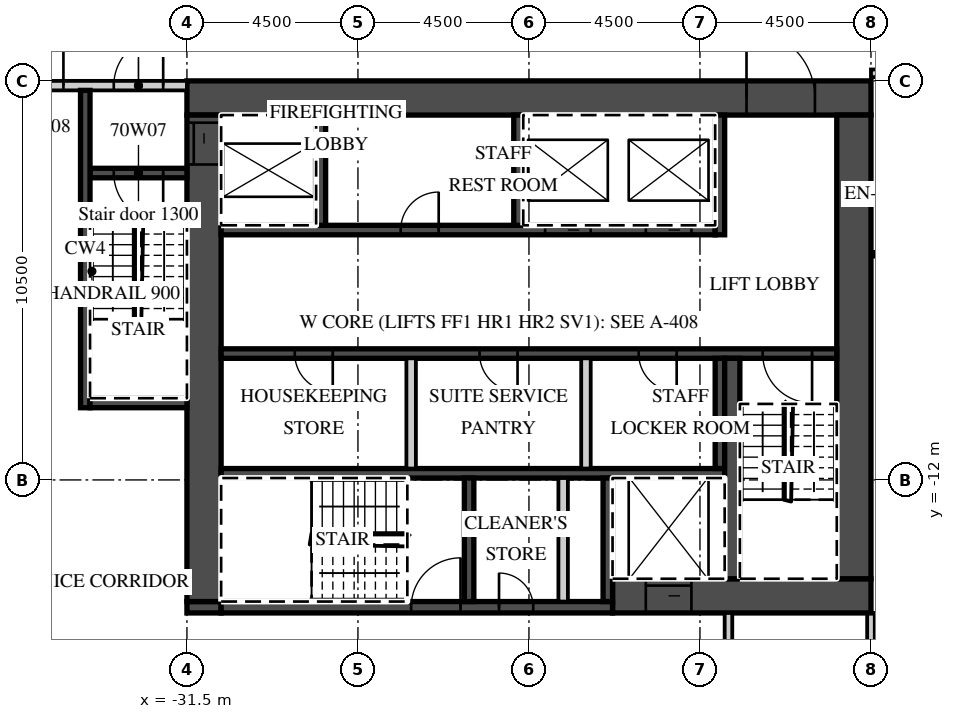
"""IFC4 building model, lengths in metres.
Left out: names, types, materials, properties, quantities, classifications, styles, units other than length and angle.
Written with IfcOpenShell. Run it as: python <this file> out.ifc"""

import sys

from ifc_helpers import new_model, si_unit, direction, frame, frame_2d, origin, place, context, subcontext, project, spatial, rectangle, extrude, element, fill, save


model = new_model("IFC4")
c1 = context("Model", 3, precision=1e-05, world=origin(), true_north=direction((0.0, 1.0)))
c2 = subcontext(c1, "Body", "Model", "MODEL_VIEW")
j1 = project(units=[si_unit("LENGTHUNIT", "METRE"), si_unit("PLANEANGLEUNIT", "RADIAN")], contexts=[c1])
p1 = place(None, origin())
s1 = spatial("IfcSite", under=j1, at=p1, CompositionType="ELEMENT")
p2 = place(p1, origin())
s2 = spatial("IfcBuilding", under=s1, at=p2, CompositionType="ELEMENT")
p3 = place(p2, frame((0.0, 0.0, 281.7)))
s3 = spatial("IfcBuildingStorey", under=s2, at=p3, CompositionType="ELEMENT", Elevation=281.7)
p4 = place(p3, frame((-13.5, -21.396, 0.0), z_axis=(0.0, 0.0, 1.0), x_axis=(0.0, 1.0, 0.0)))
e1 = element("IfcWall", 1, at=p4, inside=s3, PredefinedType="PARTITIONING", context=c2, shape_type="SweptSolid", body=[
    extrude(rectangle(XDim=5.896, YDim=0.2, at=frame_2d((2.948, 0.0))), origin(), (0.0, 0.0, 1.0), 3.02),
])
p5 = place(p3, frame((-13.5, -1.3, 0.0), z_axis=(0.0, 0.0, 1.0), x_axis=(1.0, 0.0, 0.0)))
e2 = element("IfcWall", 2, at=p5, inside=s3, PredefinedType="PARTITIONING", context=c2, shape_type="SweptSolid", body=[
    extrude(rectangle(XDim=50.293, YDim=0.2, at=frame_2d((25.146, 0.0))), origin(), (0.0, 0.0, 1.0), 3.02),
])
p6 = place(p5, frame((2.925, 0.0, 0.0)))
e3 = element("IfcOpeningElement", 3, at=p6, cuts=e2, PredefinedType="OPENING", context=c2, shape_type="SweptSolid", body=[
    extrude(rectangle(XDim=1.0, YDim=2.1, at=frame_2d((0.5, 1.05))), frame((0.0, 0.11, 0.0), z_axis=(0.0, -1.0, 0.0), x_axis=(1.0, 0.0, 0.0)), (0.0, 0.0, 1.0), 0.22),
])
p7 = place(p5, frame((6.938, 0.0, 0.0)))
e4 = element("IfcOpeningElement", 4, at=p7, cuts=e2, PredefinedType="OPENING", context=c2, shape_type="SweptSolid", body=[
    extrude(rectangle(XDim=1.2, YDim=2.1, at=frame_2d((0.6, 1.05))), frame((0.0, 0.11, 0.0), z_axis=(0.0, -1.0, 0.0), x_axis=(1.0, 0.0, 0.0)), (0.0, 0.0, 1.0), 0.22),
])
p8 = place(p5, frame((14.075, 0.0, 0.0)))
e5 = element("IfcOpeningElement", 5, at=p8, cuts=e2, PredefinedType="OPENING", context=c2, shape_type="SweptSolid", body=[
    extrude(rectangle(XDim=1.0, YDim=2.1, at=frame_2d((0.5, 1.05))), frame((0.0, 0.11, 0.0), z_axis=(0.0, -1.0, 0.0), x_axis=(1.0, 0.0, 0.0)), (0.0, 0.0, 1.0), 0.22),
])
p9 = place(p5, frame((18.55, 0.0, 0.0)))
e6 = element("IfcOpeningElement", 6, at=p9, cuts=e2, PredefinedType="OPENING", context=c2, shape_type="SweptSolid", body=[
    extrude(rectangle(XDim=1.0, YDim=2.1, at=frame_2d((0.5, 1.05))), frame((0.0, 0.11, 0.0), z_axis=(0.0, -1.0, 0.0), x_axis=(1.0, 0.0, 0.0)), (0.0, 0.0, 1.0), 0.22),
])
p10 = place(p5, frame((23.075, 0.0, 0.0)))
e7 = element("IfcOpeningElement", 7, at=p10, cuts=e2, PredefinedType="OPENING", context=c2, shape_type="SweptSolid", body=[
    extrude(rectangle(XDim=1.0, YDim=2.1, at=frame_2d((0.5, 1.05))), frame((0.0, 0.11, 0.0), z_axis=(0.0, -1.0, 0.0), x_axis=(1.0, 0.0, 0.0)), (0.0, 0.0, 1.0), 0.22),
])
p11 = place(p5, frame((29.925, 0.0, 0.0)))
e8 = element("IfcOpeningElement", 8, at=p11, cuts=e2, PredefinedType="OPENING", context=c2, shape_type="SweptSolid", body=[
    extrude(rectangle(XDim=1.0, YDim=2.1, at=frame_2d((0.5, 1.05))), frame((0.0, 0.11, 0.0), z_axis=(0.0, -1.0, 0.0), x_axis=(1.0, 0.0, 0.0)), (0.0, 0.0, 1.0), 0.22),
])
p12 = place(p5, frame((32.075, 0.0, 0.0)))
e9 = element("IfcOpeningElement", 9, at=p12, cuts=e2, PredefinedType="OPENING", context=c2, shape_type="SweptSolid", body=[
    extrude(rectangle(XDim=1.0, YDim=2.1, at=frame_2d((0.5, 1.05))), frame((0.0, 0.11, 0.0), z_axis=(0.0, -1.0, 0.0), x_axis=(1.0, 0.0, 0.0)), (0.0, 0.0, 1.0), 0.22),
])
p13 = place(p5, frame((36.55, 0.0, 0.0)))
e10 = element("IfcOpeningElement", 10, at=p13, cuts=e2, PredefinedType="OPENING", context=c2, shape_type="SweptSolid", body=[
    extrude(rectangle(XDim=1.0, YDim=2.1, at=frame_2d((0.5, 1.05))), frame((0.0, 0.11, 0.0), z_axis=(0.0, -1.0, 0.0), x_axis=(1.0, 0.0, 0.0)), (0.0, 0.0, 1.0), 0.22),
])
p14 = place(p5, frame((42.938, 0.0, 0.0)))
e11 = element("IfcOpeningElement", 11, at=p14, cuts=e2, PredefinedType="OPENING", context=c2, shape_type="SweptSolid", body=[
    extrude(rectangle(XDim=1.2, YDim=2.1, at=frame_2d((0.6, 1.05))), frame((0.0, 0.11, 0.0), z_axis=(0.0, -1.0, 0.0), x_axis=(1.0, 0.0, 0.0)), (0.0, 0.0, 1.0), 0.22),
])
p15 = place(p3, frame((-31.5, -1.95, 0.0), z_axis=(0.0, 0.0, 1.0), x_axis=(1.0, 0.0, 0.0)))
e12 = element("IfcWall", 12, at=p15, inside=s3, PredefinedType="SHEAR", context=c2, shape_type="SweptSolid", body=[
    extrude(rectangle(XDim=18.0, YDim=0.9, at=frame_2d((9.0, 0.0))), origin(), (0.0, 0.0, 1.0), 3.02),
])
p16 = place(p15, frame((14.725, 0.0, 0.0)))
e13 = element("IfcOpeningElement", 13, at=p16, cuts=e12, PredefinedType="OPENING", context=c2, shape_type="SweptSolid", body=[
    extrude(rectangle(XDim=1.8, YDim=2.1, at=frame_2d((0.9, 1.05))), frame((0.0, 0.46, 0.0), z_axis=(0.0, -1.0, 0.0), x_axis=(1.0, 0.0, 0.0)), (0.0, 0.0, 1.0), 0.92),
])
p17 = place(p3, frame((-20.3, -15.05, 0.0), z_axis=(0.0, 0.0, 1.0), x_axis=(1.0, 0.0, 0.0)))
e14 = element("IfcWall", 14, at=p17, inside=s3, PredefinedType="SHEAR", context=c2, shape_type="SweptSolid", body=[
    extrude(rectangle(XDim=6.8, YDim=0.9, at=frame_2d((3.4, 0.0))), origin(), (0.0, 0.0, 1.0), 3.02),
])
p18 = place(p17, frame((0.875, 0.0, 0.0)))
e15 = element("IfcOpeningElement", 15, at=p18, cuts=e14, PredefinedType="OPENING", context=c2, shape_type="SweptSolid", body=[
    extrude(rectangle(XDim=1.2, YDim=2.1, at=frame_2d((0.6, 1.05))), frame((0.0, 0.46, 0.0), z_axis=(0.0, -1.0, 0.0), x_axis=(1.0, 0.0, 0.0)), (0.0, 0.0, 1.0), 0.92),
])
p19 = place(p3, frame((-31.5, -15.35, 0.0), z_axis=(0.0, 0.0, 1.0), x_axis=(1.0, 0.0, 0.0)))
e16 = element("IfcWall", 16, at=p19, inside=s3, PredefinedType="SHEAR", context=c2, shape_type="SweptSolid", body=[
    extrude(rectangle(XDim=0.9, YDim=0.3, at=frame_2d((0.45, 0.0))), origin(), (0.0, 0.0, 1.0), 3.02),
])
p20 = place(p3, frame((-30.6, -15.35, 0.0), z_axis=(0.0, 0.0, 1.0), x_axis=(1.0, 0.0, 0.0)))
e17 = element("IfcWall", 17, at=p20, inside=s3, PredefinedType="SHEAR", context=c2, shape_type="SweptSolid", body=[
    extrude(rectangle(XDim=10.3, YDim=0.3, at=frame_2d((5.15, 0.0))), origin(), (0.0, 0.0, 1.0), 3.02),
])
p21 = place(p20, frame((5.0, 0.0, 0.0)))
e18 = element("IfcOpeningElement", 18, at=p21, cuts=e17, PredefinedType="OPENING", context=c2, shape_type="SweptSolid", body=[
    extrude(rectangle(XDim=1.3, YDim=2.1, at=frame_2d((0.65, 1.05))), frame((0.0, 0.16, 0.0), z_axis=(0.0, -1.0, 0.0), x_axis=(1.0, 0.0, 0.0)), (0.0, 0.0, 1.0), 0.32),
])
p22 = place(p20, frame((7.312, 0.0, 0.0)))
e19 = element("IfcOpeningElement", 19, at=p22, cuts=e17, PredefinedType="OPENING", context=c2, shape_type="SweptSolid", body=[
    extrude(rectangle(XDim=0.9, YDim=2.1, at=frame_2d((0.45, 1.05))), frame((0.0, 0.16, 0.0), z_axis=(0.0, -1.0, 0.0), x_axis=(1.0, 0.0, 0.0)), (0.0, 0.0, 1.0), 0.32),
])
p23 = place(p3, frame((-31.05, -15.2, 0.0), z_axis=(0.0, 0.0, 1.0), x_axis=(0.0, 1.0, 0.0)))
e20 = element("IfcWall", 20, at=p23, inside=s3, PredefinedType="SHEAR", context=c2, shape_type="SweptSolid", body=[
    extrude(rectangle(XDim=12.8, YDim=0.9, at=frame_2d((6.4, 0.0))), origin(), (0.0, 0.0, 1.0), 3.02),
])
p24 = place(p23, frame((11.5, 0.0, 0.0)))
e21 = element("IfcOpeningElement", 21, at=p24, cuts=e20, PredefinedType="OPENING", context=c2, shape_type="SweptSolid", body=[
    extrude(rectangle(XDim=1.1, YDim=2.1, at=frame_2d((0.55, 1.05))), frame((0.0, 0.46, 0.0), z_axis=(0.0, -1.0, 0.0), x_axis=(1.0, 0.0, 0.0)), (0.0, 0.0, 1.0), 0.92),
])
p25 = place(p3, frame((-13.95, -14.6, 0.0), z_axis=(0.0, 0.0, 1.0), x_axis=(0.0, 1.0, 0.0)))
e22 = element("IfcWall", 22, at=p25, inside=s3, PredefinedType="SHEAR", context=c2, shape_type="SweptSolid", body=[
    extrude(rectangle(XDim=12.2, YDim=0.9, at=frame_2d((6.1, 0.0))), origin(), (0.0, 0.0, 1.0), 3.02),
])
p26 = place(p3, frame((-30.6, -5.425, 0.0), z_axis=(0.0, 0.0, 1.0), x_axis=(1.0, 0.0, 0.0)))
e23 = element("IfcWall", 23, at=p26, inside=s3, PredefinedType="SHEAR", context=c2, shape_type="SweptSolid", body=[
    extrude(rectangle(XDim=13.0, YDim=0.25, at=frame_2d((6.5, 0.0))), origin(), (0.0, 0.0, 1.0), 3.02),
])
p27 = place(p26, frame((8.525, 0.0, 0.0)))
e24 = element("IfcOpeningElement", 24, at=p27, cuts=e23, PredefinedType="OPENING", context=c2, shape_type="SweptSolid", body=[
    extrude(rectangle(XDim=1.2, YDim=2.1, at=frame_2d((0.6, 1.05))), frame((0.0, 0.135, 0.0), z_axis=(0.0, -1.0, 0.0), x_axis=(1.0, 0.0, 0.0)), (0.0, 0.0, 1.0), 0.27),
])
p28 = place(p26, frame((11.175, 0.0, 0.0)))
e25 = element("IfcOpeningElement", 25, at=p28, cuts=e23, PredefinedType="OPENING", context=c2, shape_type="SweptSolid", body=[
    extrude(rectangle(XDim=1.2, YDim=2.1, at=frame_2d((0.6, 1.05))), frame((0.0, 0.135, 0.0), z_axis=(0.0, -1.0, 0.0), x_axis=(1.0, 0.0, 0.0)), (0.0, 0.0, 1.0), 0.27),
])
p29 = place(p26, frame((4.725, 0.0, 0.0)))
e26 = element("IfcOpeningElement", 26, at=p29, cuts=e23, PredefinedType="OPENING", context=c2, shape_type="SweptSolid", body=[
    extrude(rectangle(XDim=1.0, YDim=2.1, at=frame_2d((0.5, 1.05))), frame((0.0, 0.135, 0.0), z_axis=(0.0, -1.0, 0.0), x_axis=(1.0, 0.0, 0.0)), (0.0, 0.0, 1.0), 0.27),
])
p30 = place(p3, frame((-17.475, -5.55, 0.0), z_axis=(0.0, 0.0, 1.0), x_axis=(0.0, 1.0, 0.0)))
e27 = element("IfcWall", 27, at=p30, inside=s3, PredefinedType="SHEAR", context=c2, shape_type="SweptSolid", body=[
    extrude(rectangle(XDim=3.15, YDim=0.25, at=frame_2d((1.575, 0.0))), origin(), (0.0, 0.0, 1.0), 3.02),
])
for number, where, z_axis, x_axis in (
    (28, (-27.975, -5.3, 0.0), (0.0, 0.0, 1.0), (0.0, 1.0, 0.0)),
    (29, (-22.775, -5.3, 0.0), (0.0, 0.0, 1.0), (0.0, 1.0, 0.0)),
):
    element("IfcWall", number, at=place(p3, frame(where, z_axis=z_axis, x_axis=x_axis)), inside=s3, PredefinedType="SHEAR", context=c2, shape_type="SweptSolid", body=[
        extrude(rectangle(XDim=2.9, YDim=0.25, at=frame_2d((1.45, 0.0))), origin(), (0.0, 0.0, 1.0), 3.02),
    ])
p31 = place(p3, frame((-30.6, -8.675, 0.0), z_axis=(0.0, 0.0, 1.0), x_axis=(1.0, 0.0, 0.0)))
e30 = element("IfcWall", 30, at=p31, inside=s3, PredefinedType="SHEAR", context=c2, shape_type="SweptSolid", body=[
    extrude(rectangle(XDim=16.2, YDim=0.25, at=frame_2d((8.1, 0.0))), origin(), (0.0, 0.0, 1.0), 3.02),
])
p32 = place(p31, frame((14.25, 0.0, 0.0)))
e31 = element("IfcOpeningElement", 31, at=p32, cuts=e30, PredefinedType="OPENING", context=c2, shape_type="SweptSolid", body=[
    extrude(rectangle(XDim=1.3, YDim=2.1, at=frame_2d((0.65, 1.05))), frame((0.0, 0.135, 0.0), z_axis=(0.0, -1.0, 0.0), x_axis=(1.0, 0.0, 0.0)), (0.0, 0.0, 1.0), 0.27),
])
p33 = place(p31, frame((1.938, 0.0, 0.0)))
e32 = element("IfcOpeningElement", 32, at=p33, cuts=e30, PredefinedType="OPENING", context=c2, shape_type="SweptSolid", body=[
    extrude(rectangle(XDim=1.0, YDim=2.1, at=frame_2d((0.5, 1.05))), frame((0.0, 0.135, 0.0), z_axis=(0.0, -1.0, 0.0), x_axis=(1.0, 0.0, 0.0)), (0.0, 0.0, 1.0), 0.27),
])
p34 = place(p31, frame((6.8, 0.0, 0.0)))
e33 = element("IfcOpeningElement", 33, at=p34, cuts=e30, PredefinedType="OPENING", context=c2, shape_type="SweptSolid", body=[
    extrude(rectangle(XDim=1.0, YDim=2.1, at=frame_2d((0.5, 1.05))), frame((0.0, 0.135, 0.0), z_axis=(0.0, -1.0, 0.0), x_axis=(1.0, 0.0, 0.0)), (0.0, 0.0, 1.0), 0.27),
])
p35 = place(p31, frame((10.988, 0.0, 0.0)))
e34 = element("IfcOpeningElement", 34, at=p35, cuts=e30, PredefinedType="OPENING", context=c2, shape_type="SweptSolid", body=[
    extrude(rectangle(XDim=1.0, YDim=2.1, at=frame_2d((0.5, 1.05))), frame((0.0, 0.135, 0.0), z_axis=(0.0, -1.0, 0.0), x_axis=(1.0, 0.0, 0.0)), (0.0, 0.0, 1.0), 0.27),
])
p36 = place(p3, frame((-30.6, -11.825, 0.0), z_axis=(0.0, 0.0, 1.0), x_axis=(1.0, 0.0, 0.0)))
e35 = element("IfcWall", 35, at=p36, inside=s3, PredefinedType="SHEAR", context=c2, shape_type="SweptSolid", body=[
    extrude(rectangle(XDim=13.25, YDim=0.25, at=frame_2d((6.625, 0.0))), origin(), (0.0, 0.0, 1.0), 3.02),
])
p37 = place(p3, frame((-17.475, -11.7, 0.0), z_axis=(0.0, 0.0, 1.0), x_axis=(0.0, 1.0, 0.0)))
e36 = element("IfcWall", 36, at=p37, inside=s3, PredefinedType="SHEAR", context=c2, shape_type="SweptSolid", body=[
    extrude(rectangle(XDim=2.9, YDim=0.25, at=frame_2d((1.45, 0.0))), origin(), (0.0, 0.0, 1.0), 3.02),
])
for number, where, z_axis, x_axis in (
    (37, (-25.6, -11.7, 0.0), (0.0, 0.0, 1.0), (0.0, 1.0, 0.0)),
    (38, (-21.0, -11.7, 0.0), (0.0, 0.0, 1.0), (0.0, 1.0, 0.0)),
):
    element("IfcWall", number, at=place(p3, frame(where, z_axis=z_axis, x_axis=x_axis)), inside=s3, PredefinedType="PARTITIONING", context=c2, shape_type="SweptSolid", body=[
        extrude(rectangle(XDim=2.9, YDim=0.25, at=frame_2d((1.45, 0.0))), origin(), (0.0, 0.0, 1.0), 3.02),
    ])
p38 = place(p3, frame((-17.15, -14.6, 0.0), z_axis=(0.0, 0.0, 1.0), x_axis=(0.0, 1.0, 0.0)))
e39 = element("IfcWall", 39, at=p38, inside=s3, PredefinedType="SHEAR", context=c2, shape_type="SweptSolid", body=[
    extrude(rectangle(XDim=5.8, YDim=0.4, at=frame_2d((2.9, 0.0))), origin(), (0.0, 0.0, 1.0), 3.02),
])
for number, where, z_axis, x_axis in (
    (40, (-20.425, -15.2, 0.0), (0.0, 0.0, 1.0), (0.0, 1.0, 0.0)),
    (41, (-24.075, -15.2, 0.0), (0.0, 0.0, 1.0), (0.0, 1.0, 0.0)),
):
    element("IfcWall", number, at=place(p3, frame(where, z_axis=z_axis, x_axis=x_axis)), inside=s3, PredefinedType="SHEAR", context=c2, shape_type="SweptSolid", body=[
        extrude(rectangle(XDim=3.25, YDim=0.25, at=frame_2d((1.625, 0.0))), origin(), (0.0, 0.0, 1.0), 3.02),
    ])
p39 = place(p3, frame((-21.6, -15.2, 0.0), z_axis=(0.0, 0.0, 1.0), x_axis=(0.0, 1.0, 0.0)))
e42 = element("IfcWall", 42, at=p39, inside=s3, PredefinedType="PARTITIONING", context=c2, shape_type="SweptSolid", body=[
    extrude(rectangle(XDim=3.25, YDim=0.25, at=frame_2d((1.625, 0.0))), origin(), (0.0, 0.0, 1.0), 3.02),
])
p40 = place(p3, frame((-39.627, -1.625, 0.0), z_axis=(0.0, 0.0, 1.0), x_axis=(1.0, 0.0, 0.0)))
e43 = element("IfcWall", 43, at=p40, inside=s3, PredefinedType="PARTITIONING", context=c2, shape_type="SweptSolid", body=[
    extrude(rectangle(XDim=8.127, YDim=0.25, at=frame_2d((4.063, 0.0))), origin(), (0.0, 0.0, 1.0), 3.02),
])
p41 = place(p40, frame((6.202, 0.0, 0.0)))
e44 = element("IfcOpeningElement", 44, at=p41, cuts=e43, PredefinedType="OPENING", context=c2, shape_type="SweptSolid", body=[
    extrude(rectangle(XDim=1.3, YDim=2.1, at=frame_2d((0.65, 1.05))), frame((0.0, 0.135, 0.0), z_axis=(0.0, -1.0, 0.0), x_axis=(1.0, 0.0, 0.0)), (0.0, 0.0, 1.0), 0.27),
])
p42 = place(p40, frame((3.777, 0.0, 0.0)))
e45 = element("IfcOpeningElement", 45, at=p42, cuts=e43, PredefinedType="OPENING", context=c2, shape_type="SweptSolid", body=[
    extrude(rectangle(XDim=1.1, YDim=2.1, at=frame_2d((0.55, 1.05))), frame((0.0, 0.135, 0.0), z_axis=(0.0, -1.0, 0.0), x_axis=(1.0, 0.0, 0.0)), (0.0, 0.0, 1.0), 0.27),
])
p43 = place(p3, frame((-34.05, -3.925, 0.0), z_axis=(0.0, 0.0, 1.0), x_axis=(1.0, 0.0, 0.0)))
e46 = element("IfcWall", 46, at=p43, inside=s3, PredefinedType="SHEAR", context=c2, shape_type="SweptSolid", body=[
    extrude(rectangle(XDim=2.55, YDim=0.25, at=frame_2d((1.275, 0.0))), origin(), (0.0, 0.0, 1.0), 3.02),
])
p44 = place(p43, frame((0.625, 0.0, 0.0)))
e47 = element("IfcOpeningElement", 47, at=p44, cuts=e46, PredefinedType="OPENING", context=c2, shape_type="SweptSolid", body=[
    extrude(rectangle(XDim=1.3, YDim=2.1, at=frame_2d((0.65, 1.05))), frame((0.0, 0.135, 0.0), z_axis=(0.0, -1.0, 0.0), x_axis=(1.0, 0.0, 0.0)), (0.0, 0.0, 1.0), 0.27),
])
p45 = place(p3, frame((-34.175, -10.1, 0.0), z_axis=(0.0, 0.0, 1.0), x_axis=(0.0, 1.0, 0.0)))
e48 = element("IfcWall", 48, at=p45, inside=s3, PredefinedType="SHEAR", context=c2, shape_type="SweptSolid", body=[
    extrude(rectangle(XDim=8.35, YDim=0.25, at=frame_2d((4.175, 0.0))), origin(), (0.0, 0.0, 1.0), 3.02),
])
p46 = place(p3, frame((-34.05, -9.975, 0.0), z_axis=(0.0, 0.0, 1.0), x_axis=(1.0, 0.0, 0.0)))
e49 = element("IfcWall", 49, at=p46, inside=s3, PredefinedType="SHEAR", context=c2, shape_type="SweptSolid", body=[
    extrude(rectangle(XDim=2.55, YDim=0.25, at=frame_2d((1.275, 0.0))), origin(), (0.0, 0.0, 1.0), 3.02),
])
p47 = place(p3, frame((-17.25, -17.7, 0.0), z_axis=(0.0, 0.0, 1.0), x_axis=(0.0, 1.0, 0.0)))
e50 = element("IfcWall", 50, at=p47, inside=s3, PredefinedType="PARTITIONING", context=c2, shape_type="SweptSolid", body=[
    extrude(rectangle(XDim=2.2, YDim=0.2, at=frame_2d((1.1, 0.0))), origin(), (0.0, 0.0, 1.0), 3.02),
])
p48 = place(p27, origin())
e51 = element("IfcDoor", 51, at=p48, inside=s3, OperationType="SLIDING_TO_LEFT", PredefinedType="DOOR", context=c2, shape_type="SweptSolid", body=[
    extrude(rectangle(XDim=1.2, YDim=2.1, at=frame_2d((0.6, 1.05))), frame((0.0, 0.025, 0.0), z_axis=(0.0, -1.0, 0.0), x_axis=(1.0, 0.0, 0.0)), (0.0, 0.0, 1.0), 0.05),
])
fill(e24, e51)
p49 = place(p28, origin())
e52 = element("IfcDoor", 52, at=p49, inside=s3, OperationType="SLIDING_TO_RIGHT", PredefinedType="DOOR", context=c2, shape_type="SweptSolid", body=[
    extrude(rectangle(XDim=1.2, YDim=2.1, at=frame_2d((0.6, 1.05))), frame((0.0, 0.025, 0.0), z_axis=(0.0, -1.0, 0.0), x_axis=(1.0, 0.0, 0.0)), (0.0, 0.0, 1.0), 0.05),
])
fill(e25, e52)
p50 = place(p18, origin())
e53 = element("IfcDoor", 53, at=p50, inside=s3, OperationType="SLIDING_TO_LEFT", PredefinedType="DOOR", context=c2, shape_type="SweptSolid", body=[
    extrude(rectangle(XDim=1.2, YDim=2.1, at=frame_2d((0.6, 1.05))), frame((0.0, 0.025, 0.0), z_axis=(0.0, -1.0, 0.0), x_axis=(1.0, 0.0, 0.0)), (0.0, 0.0, 1.0), 0.05),
])
fill(e15, e53)
p51 = place(p24, origin())
e54 = element("IfcDoor", 54, at=p51, inside=s3, OperationType="SLIDING_TO_RIGHT", PredefinedType="DOOR", context=c2, shape_type="SweptSolid", body=[
    extrude(rectangle(XDim=1.1, YDim=2.1, at=frame_2d((0.55, 1.05))), frame((0.0, 0.025, 0.0), z_axis=(0.0, -1.0, 0.0), x_axis=(1.0, 0.0, 0.0)), (0.0, 0.0, 1.0), 0.05),
])
fill(e21, e54)
p52 = place(p16, origin())
e55 = element("IfcDoor", 55, at=p52, inside=s3, OperationType="DOUBLE_DOOR_DOUBLE_SWING", PredefinedType="DOOR", context=c2, shape_type="SweptSolid", body=[
    extrude(rectangle(XDim=1.8, YDim=2.1, at=frame_2d((0.9, 1.05))), frame((0.0, 0.025, 0.0), z_axis=(0.0, -1.0, 0.0), x_axis=(1.0, 0.0, 0.0)), (0.0, 0.0, 1.0), 0.05),
])
fill(e13, e55)
p53 = place(p41, origin())
e56 = element("IfcDoor", 56, at=p53, inside=s3, OperationType="SINGLE_SWING_RIGHT", PredefinedType="DOOR", context=c2, shape_type="SweptSolid", body=[
    extrude(rectangle(XDim=1.3, YDim=2.1, at=frame_2d((0.65, 1.05))), frame((0.0, 0.025, 0.0), z_axis=(0.0, -1.0, 0.0), x_axis=(1.0, 0.0, 0.0)), (0.0, 0.0, 1.0), 0.05),
])
fill(e44, e56)
p54 = place(p44, origin())
e57 = element("IfcDoor", 57, at=p54, inside=s3, OperationType="SINGLE_SWING_RIGHT", PredefinedType="DOOR", context=c2, shape_type="SweptSolid", body=[
    extrude(rectangle(XDim=1.3, YDim=2.1, at=frame_2d((0.65, 1.05))), frame((0.0, 0.025, 0.0), z_axis=(0.0, -1.0, 0.0), x_axis=(1.0, 0.0, 0.0)), (0.0, 0.0, 1.0), 0.05),
])
fill(e47, e57)
p55 = place(p42, origin())
e58 = element("IfcDoor", 58, at=p55, inside=s3, OperationType="SINGLE_SWING_RIGHT", PredefinedType="DOOR", context=c2, shape_type="SweptSolid", body=[
    extrude(rectangle(XDim=1.1, YDim=2.1, at=frame_2d((0.55, 1.05))), frame((0.0, 0.025, 0.0), z_axis=(0.0, -1.0, 0.0), x_axis=(1.0, 0.0, 0.0)), (0.0, 0.0, 1.0), 0.05),
])
fill(e45, e58)
p56 = place(p32, origin())
e59 = element("IfcDoor", 59, at=p56, inside=s3, OperationType="SINGLE_SWING_RIGHT", PredefinedType="DOOR", context=c2, shape_type="SweptSolid", body=[
    extrude(rectangle(XDim=1.3, YDim=2.1, at=frame_2d((0.65, 1.05))), frame((0.0, 0.025, 0.0), z_axis=(0.0, -1.0, 0.0), x_axis=(1.0, 0.0, 0.0)), (0.0, 0.0, 1.0), 0.05),
])
fill(e31, e59)
p57 = place(p21, origin())
e60 = element("IfcDoor", 60, at=p57, inside=s3, OperationType="SINGLE_SWING_RIGHT", PredefinedType="DOOR", context=c2, shape_type="SweptSolid", body=[
    extrude(rectangle(XDim=1.3, YDim=2.1, at=frame_2d((0.65, 1.05))), frame((0.0, 0.025, 0.0), z_axis=(0.0, -1.0, 0.0), x_axis=(1.0, 0.0, 0.0)), (0.0, 0.0, 1.0), 0.05),
])
fill(e18, e60)
p58 = place(p22, origin())
e61 = element("IfcDoor", 61, at=p58, inside=s3, OperationType="SINGLE_SWING_LEFT", PredefinedType="DOOR", context=c2, shape_type="SweptSolid", body=[
    extrude(rectangle(XDim=0.9, YDim=2.1, at=frame_2d((0.45, 1.05))), frame((0.0, 0.025, 0.0), z_axis=(0.0, -1.0, 0.0), x_axis=(1.0, 0.0, 0.0)), (0.0, 0.0, 1.0), 0.05),
])
fill(e19, e61)
p59 = place(p33, origin())
e62 = element("IfcDoor", 62, at=p59, inside=s3, OperationType="SINGLE_SWING_RIGHT", PredefinedType="DOOR", context=c2, shape_type="SweptSolid", body=[
    extrude(rectangle(XDim=1.0, YDim=2.1, at=frame_2d((0.5, 1.05))), frame((0.0, 0.025, 0.0), z_axis=(0.0, -1.0, 0.0), x_axis=(1.0, 0.0, 0.0)), (0.0, 0.0, 1.0), 0.05),
])
fill(e32, e62)
p60 = place(p34, origin())
e63 = element("IfcDoor", 63, at=p60, inside=s3, OperationType="SINGLE_SWING_RIGHT", PredefinedType="DOOR", context=c2, shape_type="SweptSolid", body=[
    extrude(rectangle(XDim=1.0, YDim=2.1, at=frame_2d((0.5, 1.05))), frame((0.0, 0.025, 0.0), z_axis=(0.0, -1.0, 0.0), x_axis=(1.0, 0.0, 0.0)), (0.0, 0.0, 1.0), 0.05),
])
fill(e33, e63)
p61 = place(p35, origin())
e64 = element("IfcDoor", 64, at=p61, inside=s3, OperationType="SINGLE_SWING_RIGHT", PredefinedType="DOOR", context=c2, shape_type="SweptSolid", body=[
    extrude(rectangle(XDim=1.0, YDim=2.1, at=frame_2d((0.5, 1.05))), frame((0.0, 0.025, 0.0), z_axis=(0.0, -1.0, 0.0), x_axis=(1.0, 0.0, 0.0)), (0.0, 0.0, 1.0), 0.05),
])
fill(e34, e64)
p62 = place(p29, origin())
e65 = element("IfcDoor", 65, at=p62, inside=s3, OperationType="SINGLE_SWING_RIGHT", PredefinedType="DOOR", context=c2, shape_type="SweptSolid", body=[
    extrude(rectangle(XDim=1.0, YDim=2.1, at=frame_2d((0.5, 1.05))), frame((0.0, 0.025, 0.0), z_axis=(0.0, -1.0, 0.0), x_axis=(1.0, 0.0, 0.0)), (0.0, 0.0, 1.0), 0.05),
])
fill(e26, e65)
save(model, sys.argv[1])
